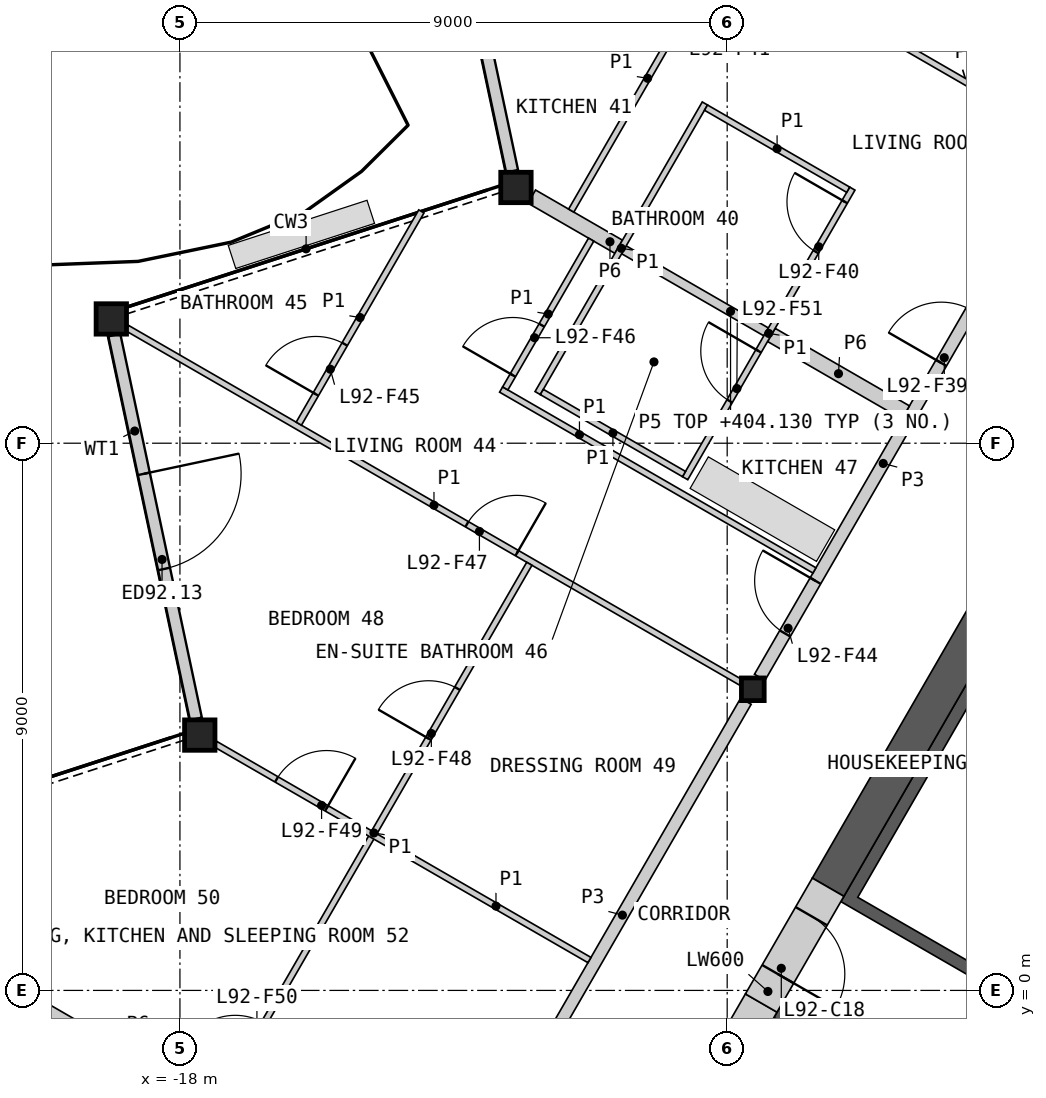
"""IFC4 building model, lengths in metres.
Left out: names, types, materials, properties, quantities, classifications, styles, units other than length and angle.
Written with IfcOpenShell. Run it as: python <this file> out.ifc"""

import sys

from ifc_helpers import new_model, si_unit, direction, frame, frame_2d, origin, origin_2d, place, context, subcontext, project, spatial, polyline, rectangle, hollow_rectangle, i_section, outline, extrude, element, fill, save


model = new_model("IFC4")
c1 = context("Model", 3, precision=1e-05, world=origin(), true_north=direction((0.0, 1.0)))
c2 = subcontext(c1, "Body", "Model", "MODEL_VIEW")
j1 = project(units=[si_unit("LENGTHUNIT", "METRE"), si_unit("PLANEANGLEUNIT", "RADIAN")], contexts=[c1])
p1 = place(None, origin())
s1 = spatial("IfcSite", under=j1, at=p1, CompositionType="ELEMENT")
p2 = place(p1, origin())
s2 = spatial("IfcBuilding", under=s1, at=p2, CompositionType="ELEMENT")
p3 = place(p2, frame((0.0, 0.0, 401.8)))
s3 = spatial("IfcBuildingStorey", under=s2, at=p3, CompositionType="ELEMENT", Elevation=401.8)
for number, where, z_axis, x_axis in (
    (1, (-12.474, 13.206, 0.0), (0.0, 0.0, 1.0), (1.0, 0.0, 0.0)),
    (2, (-19.129, 11.044, 0.0), (0.0, 0.0, 1.0), (1.0, 0.0, 0.0)),
    (3, (-17.674, 4.199, 0.0), (0.0, 0.0, 1.0), (1.0, 0.0, 0.0)),
):
    element("IfcColumn", number, at=place(p3, frame(where, z_axis=z_axis, x_axis=x_axis)), inside=s3, PredefinedType="COLUMN", context=c2, shape_type="SweptSolid", body=[
        extrude(hollow_rectangle(XDim=0.5, YDim=0.5, WallThickness=0.03, at=origin_2d()), origin(), (0.0, 0.0, 1.0), 3.4),
    ])
p4 = place(p3, frame((-8.578, 4.953, 0.0), z_axis=(0.0, 0.0, 1.0), x_axis=(1.0, 0.0, 0.0)))
e4 = element("IfcColumn", 4, at=p4, inside=s3, PredefinedType="COLUMN", context=c2, shape_type="SweptSolid", body=[
    extrude(i_section(OverallWidth=0.374, OverallDepth=0.372, WebThickness=0.016, FlangeThickness=0.026, at=origin_2d()), origin(), (0.0, 0.0, 1.0), 3.4),
])
p5 = place(p3, frame((-13.879, 19.785, 0.0), z_axis=(0.0, 0.0, 1.0), x_axis=(0.207895859675, -0.978150965613, 0.0)))
e5 = element("IfcWall", 5, at=p5, inside=s3, PredefinedType="SOLIDWALL", context=c2, shape_type="SweptSolid", body=[
    extrude(rectangle(XDim=6.453, YDim=0.2, at=frame_2d((3.227, 0.0))), origin(), (0.0, 0.0, 1.0), 2.634),
])
p6 = place(p5, frame((2.333, 0.0, 0.0)))
e6 = element("IfcOpeningElement", 6, at=p6, cuts=e5, PredefinedType="OPENING", context=c2, shape_type="SweptSolid", body=[
    extrude(rectangle(XDim=1.6, YDim=2.25, at=frame_2d((0.8, 1.125))), frame((0.0, 0.11, 0.0), z_axis=(0.0, -1.0, 0.0), x_axis=(1.0, 0.0, 0.0)), (0.0, 0.0, 1.0), 0.22),
])
p7 = place(p3, frame((-19.079, 10.778, 0.0), z_axis=(0.0, 0.0, 1.0), x_axis=(0.207888166349, -0.978152600718, 0.0)))
e7 = element("IfcWall", 7, at=p7, inside=s3, PredefinedType="SOLIDWALL", context=c2, shape_type="SweptSolid", body=[
    extrude(rectangle(XDim=6.453, YDim=0.2, at=frame_2d((3.227, 0.0))), origin(), (0.0, 0.0, 1.0), 2.634),
])
p8 = place(p7, frame((2.333, 0.0, 0.0)))
e8 = element("IfcOpeningElement", 8, at=p8, cuts=e7, PredefinedType="OPENING", context=c2, shape_type="SweptSolid", body=[
    extrude(rectangle(XDim=1.6, YDim=2.25, at=frame_2d((0.8, 1.125))), frame((0.0, 0.11, 0.0), z_axis=(0.0, -1.0, 0.0), x_axis=(1.0, 0.0, 0.0)), (0.0, 0.0, 1.0), 0.22),
])
p9 = place(p3, origin())
e9 = element("IfcWall", 9, at=p9, inside=s3, PredefinedType="SHEAR", context=c2, shape_type="SweptSolid", body=[
    extrude(outline(polyline([(-6.061, -1.697), (-8.231, -0.444), (-8.131, -0.271), (-5.96, -1.524), (-6.061, -1.697)])), origin(), (0.0, 0.0, 1.0), 3.1),
])
p10 = place(p3, origin())
e10 = element("IfcWall", 10, at=p10, inside=s3, PredefinedType="SHEAR", context=c2, shape_type="SweptSolid", body=[
    extrude(outline(polyline([(-4.96, 0.208), (-7.131, 1.461), (-3.731, 7.35), (-1.561, 6.097), (-1.66, 5.924), (-3.652, 7.074), (-6.852, 1.531), (-4.861, 0.381), (-4.96, 0.208)])), origin(), (0.0, 0.0, 1.0), 3.1),
])
p11 = place(p3, frame((-3.794, 7.84, 0.0), z_axis=(0.0, 0.0, 1.0), x_axis=(-0.499974747889, -0.866039982607, 0.0)))
e11 = element("IfcWall", 11, at=p11, inside=s3, PredefinedType="SHEAR", context=c2, shape_type="SweptSolid", body=[
    extrude(rectangle(XDim=7.092, YDim=0.6, at=frame_2d((3.546, 0.0))), origin(), (0.0, 0.0, 1.0), 3.1),
])
p12 = place(p3, frame((-8.44, -0.208, 0.0), z_axis=(0.0, 0.0, 1.0), x_axis=(-0.499997052475, -0.866027105532, 0.0)))
e12 = element("IfcWall", 12, at=p12, inside=s3, PredefinedType="SHEAR", context=c2, shape_type="SweptSolid", body=[
    extrude(rectangle(XDim=3.001, YDim=0.6, at=frame_2d((1.501, 0.0))), origin(), (0.0, 0.0, 1.0), 3.1),
])
p13 = place(p12, frame((1.4, 0.0, 0.0)))
e13 = element("IfcOpeningElement", 13, at=p13, cuts=e12, PredefinedType="OPENING", context=c2, shape_type="SweptSolid", body=[
    extrude(rectangle(XDim=1.0, YDim=2.1, at=frame_2d((0.5, 1.05))), frame((0.0, 0.31, 0.0), z_axis=(0.0, -1.0, 0.0), x_axis=(1.0, 0.0, 0.0)), (0.0, 0.0, 1.0), 0.62),
])
p14 = place(p3, frame((-7.34, 1.698, 0.0), z_axis=(0.0, 0.0, 1.0), x_axis=(-0.50002983664, -0.866008176907, 0.0)))
e14 = element("IfcWall", 14, at=p14, inside=s3, PredefinedType="SHEAR", context=c2, shape_type="SweptSolid", body=[
    extrude(rectangle(XDim=2.2, YDim=0.6, at=frame_2d((1.1, 0.0))), origin(), (0.0, 0.0, 1.0), 3.1),
])
p15 = place(p14, frame((0.55, 0.0, 0.0)))
e15 = element("IfcOpeningElement", 15, at=p15, cuts=e14, PredefinedType="OPENING", context=c2, shape_type="SweptSolid", body=[
    extrude(rectangle(XDim=1.1, YDim=2.1, at=frame_2d((0.55, 1.05))), frame((0.0, 0.31, 0.0), z_axis=(0.0, -1.0, 0.0), x_axis=(1.0, 0.0, 0.0)), (0.0, 0.0, 1.0), 0.62),
])
p16 = place(p3, frame((-24.069, 1.887, 0.0), z_axis=(0.0, 0.0, 1.0), x_axis=(0.866023404247, -0.500003463284, 0.0)))
e16 = element("IfcWall", 16, at=p16, inside=s3, PredefinedType="PARTITIONING", context=c2, shape_type="SweptSolid", body=[
    extrude(rectangle(XDim=11.782, YDim=0.25, at=frame_2d((5.891, 0.0))), origin(), (0.0, 0.0, 1.0), 2.33),
])
p17 = place(p3, frame((-8.465, 5.15, 0.0), z_axis=(0.0, 0.0, 1.0), x_axis=(0.499992155518, 0.866029932751, 0.0)))
e17 = element("IfcWall", 17, at=p17, inside=s3, PredefinedType="PARTITIONING", context=c2, shape_type="SweptSolid", body=[
    extrude(rectangle(XDim=8.123, YDim=0.2, at=frame_2d((4.062, 0.0))), origin(), (0.0, 0.0, 1.0), 3.1),
])
p18 = place(p17, frame((5.97, 0.0, 0.0)))
e18 = element("IfcOpeningElement", 18, at=p18, cuts=e17, PredefinedType="OPENING", context=c2, shape_type="SweptSolid", body=[
    extrude(rectangle(XDim=1.0, YDim=2.1, at=frame_2d((0.5, 1.05))), frame((0.0, 0.11, 0.0), z_axis=(0.0, -1.0, 0.0), x_axis=(1.0, 0.0, 0.0)), (0.0, 0.0, 1.0), 0.22),
])
p19 = place(p17, frame((0.832, 0.0, 0.0)))
e19 = element("IfcOpeningElement", 19, at=p19, cuts=e17, PredefinedType="OPENING", context=c2, shape_type="SweptSolid", body=[
    extrude(rectangle(XDim=1.0, YDim=2.1, at=frame_2d((0.5, 1.05))), frame((0.0, 0.11, 0.0), z_axis=(0.0, -1.0, 0.0), x_axis=(1.0, 0.0, 0.0)), (0.0, 0.0, 1.0), 0.22),
])
p20 = place(p3, frame((-12.754, -2.279, 0.0), z_axis=(0.0, 0.0, 1.0), x_axis=(0.500001682468, 0.866024432409, 0.0)))
e20 = element("IfcWall", 20, at=p20, inside=s3, PredefinedType="PARTITIONING", context=c2, shape_type="SweptSolid", body=[
    extrude(rectangle(XDim=8.124, YDim=0.2, at=frame_2d((4.062, 0.0))), origin(), (0.0, 0.0, 1.0), 3.1),
])
p21 = place(p3, frame((-8.273, 10.781, 0.0), z_axis=(0.0, 0.0, 1.0), x_axis=(0.866030925526, -0.499990435942, 0.0)))
e21 = element("IfcWall", 21, at=p21, inside=s3, PredefinedType="PARTITIONING", context=c2, shape_type="SweptSolid", body=[
    extrude(rectangle(XDim=2.55, YDim=0.25, at=frame_2d((1.275, 0.0))), origin(), (0.0, 0.0, 1.0), 2.33),
])
p22 = place(p3, frame((-12.214, 13.056, 0.0), z_axis=(0.0, 0.0, 1.0), x_axis=(0.866040211805, -0.499974350878, 0.0)))
e22 = element("IfcWall", 22, at=p22, inside=s3, PredefinedType="PARTITIONING", context=c2, shape_type="SweptSolid", body=[
    extrude(rectangle(XDim=1.65, YDim=0.25, at=frame_2d((0.825, 0.0))), origin(), (0.0, 0.0, 1.0), 2.33),
])
p23 = place(p3, frame((-10.698, 12.181, 0.0), z_axis=(0.0, 0.0, 1.0), x_axis=(0.86599734893, -0.500048589285, 0.0)))
e23 = element("IfcWall", 23, at=p23, inside=s3, PredefinedType="PLUMBINGWALL", context=c2, shape_type="SweptSolid", body=[
    extrude(rectangle(XDim=2.7, YDim=0.15, at=frame_2d((1.35, 0.0))), origin(), (0.0, 0.0, 1.0), 2.33),
])
p24 = place(p3, frame((-13.669, 19.9, 0.0), z_axis=(0.0, 0.0, 1.0), x_axis=(0.866032376801, -0.499987922186, 0.0)))
e24 = element("IfcWall", 24, at=p24, inside=s3, PredefinedType="PARTITIONING", context=c2, shape_type="SweptSolid", body=[
    extrude(rectangle(XDim=11.782, YDim=0.1, at=frame_2d((5.891, 0.0))), origin(), (0.0, 0.0, 1.0), 2.33),
])
p25 = place(p24, frame((3.661, 0.0, 0.0)))
e25 = element("IfcOpeningElement", 25, at=p25, cuts=e24, PredefinedType="OPENING", context=c2, shape_type="SweptSolid", body=[
    extrude(rectangle(XDim=0.95, YDim=2.1, at=frame_2d((0.475, 1.05))), frame((0.0, 0.06, 0.0), z_axis=(0.0, -1.0, 0.0), x_axis=(1.0, 0.0, 0.0)), (0.0, 0.0, 1.0), 0.12),
])
p26 = place(p3, frame((-18.869, 10.894, 0.0), z_axis=(0.0, 0.0, 1.0), x_axis=(0.866023724155, -0.500002909193, 0.0)))
e26 = element("IfcWall", 26, at=p26, inside=s3, PredefinedType="PARTITIONING", context=c2, shape_type="SweptSolid", body=[
    extrude(rectangle(XDim=11.655, YDim=0.1, at=frame_2d((5.827, 0.0))), origin(), (0.0, 0.0, 1.0), 2.33),
])
p27 = place(p26, frame((6.453, 0.0, 0.0)))
e27 = element("IfcOpeningElement", 27, at=p27, cuts=e26, PredefinedType="OPENING", context=c2, shape_type="SweptSolid", body=[
    extrude(rectangle(XDim=0.95, YDim=2.1, at=frame_2d((0.475, 1.05))), frame((0.0, 0.06, 0.0), z_axis=(0.0, -1.0, 0.0), x_axis=(1.0, 0.0, 0.0)), (0.0, 0.0, 1.0), 0.12),
])
p28 = place(p3, frame((-17.366, -1.838, 0.0), z_axis=(0.0, 0.0, 1.0), x_axis=(0.499998717582, 0.866026144187, 0.0)))
e28 = element("IfcWall", 28, at=p28, inside=s3, PredefinedType="PARTITIONING", context=c2, shape_type="SweptSolid", body=[
    extrude(rectangle(XDim=10.225, YDim=0.1, at=frame_2d((5.113, 0.0))), origin(), (0.0, 0.0, 1.0), 2.33),
])
p29 = place(p28, frame((6.907, 0.0, 0.0)))
e29 = element("IfcOpeningElement", 29, at=p29, cuts=e28, PredefinedType="OPENING", context=c2, shape_type="SweptSolid", body=[
    extrude(rectangle(XDim=0.95, YDim=2.1, at=frame_2d((0.475, 1.05))), frame((0.0, 0.06, 0.0), z_axis=(0.0, -1.0, 0.0), x_axis=(1.0, 0.0, 0.0)), (0.0, 0.0, 1.0), 0.12),
])
p30 = place(p28, frame((0.552, 0.0, 0.0)))
e30 = element("IfcOpeningElement", 30, at=p30, cuts=e28, PredefinedType="OPENING", context=c2, shape_type="SweptSolid", body=[
    extrude(rectangle(XDim=0.95, YDim=2.1, at=frame_2d((0.475, 1.05))), frame((0.0, 0.06, 0.0), z_axis=(0.0, -1.0, 0.0), x_axis=(1.0, 0.0, 0.0)), (0.0, 0.0, 1.0), 0.12),
])
p31 = place(p3, frame((-17.414, 4.049, 0.0), z_axis=(0.0, 0.0, 1.0), x_axis=(0.866033839264, -0.499985389037, 0.0)))
e31 = element("IfcWall", 31, at=p31, inside=s3, PredefinedType="PARTITIONING", context=c2, shape_type="SweptSolid", body=[
    extrude(rectangle(XDim=7.1, YDim=0.1, at=frame_2d((3.55, 0.0))), origin(), (0.0, 0.0, 1.0), 2.33),
])
p32 = place(p31, frame((1.158, 0.0, 0.0)))
e32 = element("IfcOpeningElement", 32, at=p32, cuts=e31, PredefinedType="OPENING", context=c2, shape_type="SweptSolid", body=[
    extrude(rectangle(XDim=0.95, YDim=2.1, at=frame_2d((0.475, 1.05))), frame((0.0, 0.06, 0.0), z_axis=(0.0, -1.0, 0.0), x_axis=(1.0, 0.0, 0.0)), (0.0, 0.0, 1.0), 0.12),
])
p33 = place(p3, frame((-12.718, 9.883, 0.0), z_axis=(0.0, 0.0, 1.0), x_axis=(0.866017493347, -0.500013701029, 0.0)))
e33 = element("IfcWall", 33, at=p33, inside=s3, PredefinedType="PARTITIONING", context=c2, shape_type="SweptSolid", body=[
    extrude(rectangle(XDim=5.95, YDim=0.1, at=frame_2d((2.975, 0.0))), origin(), (0.0, 0.0, 1.0), 2.33),
])
p34 = place(p3, frame((-12.117, 9.824, 0.0), z_axis=(0.0, 0.0, 1.0), x_axis=(0.499996545922, 0.866027397988, 0.0)))
e34 = element("IfcWall", 34, at=p34, inside=s3, PredefinedType="PARTITIONING", context=c2, shape_type="SweptSolid", body=[
    extrude(rectangle(XDim=5.5, YDim=0.1, at=frame_2d((2.75, 0.0))), origin(), (0.0, 0.0, 1.0), 2.33),
])
p35 = place(p3, frame((-9.692, 8.425, 0.0), z_axis=(0.0, 0.0, 1.0), x_axis=(0.499996545922, 0.866027397988, 0.0)))
e35 = element("IfcWall", 35, at=p35, inside=s3, PredefinedType="PARTITIONING", context=c2, shape_type="SweptSolid", body=[
    extrude(rectangle(XDim=5.5, YDim=0.1, at=frame_2d((2.75, 0.0))), origin(), (0.0, 0.0, 1.0), 2.33),
])
p36 = place(p35, frame((4.3, 0.0, 0.0)))
e36 = element("IfcOpeningElement", 36, at=p36, cuts=e35, PredefinedType="OPENING", context=c2, shape_type="SweptSolid", body=[
    extrude(rectangle(XDim=0.95, YDim=2.1, at=frame_2d((0.475, 1.05))), frame((0.0, 0.06, 0.0), z_axis=(0.0, -1.0, 0.0), x_axis=(1.0, 0.0, 0.0)), (0.0, 0.0, 1.0), 0.12),
])
p37 = place(p35, frame((1.465, 0.0, 0.0)))
e37 = element("IfcOpeningElement", 37, at=p37, cuts=e35, PredefinedType="OPENING", context=c2, shape_type="SweptSolid", body=[
    extrude(rectangle(XDim=0.95, YDim=2.1, at=frame_2d((0.475, 1.05))), frame((0.0, 0.06, 0.0), z_axis=(0.0, -1.0, 0.0), x_axis=(1.0, 0.0, 0.0)), (0.0, 0.0, 1.0), 0.12),
])
p38 = place(p3, frame((-11.565, 12.826, 0.0), z_axis=(0.0, 0.0, 1.0), x_axis=(0.499990214365, 0.86603105345, 0.0)))
e38 = element("IfcWall", 38, at=p38, inside=s3, PredefinedType="PARTITIONING", context=c2, shape_type="SweptSolid", body=[
    extrude(rectangle(XDim=5.025, YDim=0.1, at=frame_2d((2.512, 0.0))), origin(), (0.0, 0.0, 1.0), 2.33),
])
p39 = place(p38, frame((3.11, 0.0, 0.0)))
e39 = element("IfcOpeningElement", 39, at=p39, cuts=e38, PredefinedType="OPENING", context=c2, shape_type="SweptSolid", body=[
    extrude(rectangle(XDim=0.95, YDim=2.1, at=frame_2d((0.475, 1.05))), frame((0.0, 0.06, 0.0), z_axis=(0.0, -1.0, 0.0), x_axis=(1.0, 0.0, 0.0)), (0.0, 0.0, 1.0), 0.12),
])
p40 = place(p3, frame((-16.045, 9.321, 0.0), z_axis=(0.0, 0.0, 1.0), x_axis=(0.500014251897, 0.866017175291, 0.0)))
e40 = element("IfcWall", 40, at=p40, inside=s3, PredefinedType="PARTITIONING", context=c2, shape_type="SweptSolid", body=[
    extrude(rectangle(XDim=4.032, YDim=0.1, at=frame_2d((2.016, 0.0))), origin(), (0.0, 0.0, 1.0), 2.33),
])
p41 = place(p40, frame((0.56, 0.0, 0.0)))
e41 = element("IfcOpeningElement", 41, at=p41, cuts=e40, PredefinedType="OPENING", context=c2, shape_type="SweptSolid", body=[
    extrude(rectangle(XDim=0.95, YDim=2.1, at=frame_2d((0.475, 1.05))), frame((0.0, 0.06, 0.0), z_axis=(0.0, -1.0, 0.0), x_axis=(1.0, 0.0, 0.0)), (0.0, 0.0, 1.0), 0.12),
])
p42 = place(p3, frame((-12.65, 9.901, 0.0), z_axis=(0.0, 0.0, 1.0), x_axis=(0.500024172624, 0.866011447264, 0.0)))
e42 = element("IfcWall", 42, at=p42, inside=s3, PredefinedType="PARTITIONING", context=c2, shape_type="SweptSolid", body=[
    extrude(rectangle(XDim=2.825, YDim=0.1, at=frame_2d((1.413, 0.0))), origin(), (0.0, 0.0, 1.0), 2.33),
])
p43 = place(p42, frame((0.25, 0.0, 0.0)))
e43 = element("IfcOpeningElement", 43, at=p43, cuts=e42, PredefinedType="OPENING", context=c2, shape_type="SweptSolid", body=[
    extrude(rectangle(XDim=0.95, YDim=2.1, at=frame_2d((0.475, 1.05))), frame((0.0, 0.06, 0.0), z_axis=(0.0, -1.0, 0.0), x_axis=(1.0, 0.0, 0.0)), (0.0, 0.0, 1.0), 0.12),
])
for number, where, z_axis, x_axis in (
    (44, (-9.348, 14.519, 0.0), (0.0, 0.0, 1.0), (0.866, -0.5, 0.0)),
    (45, (-12.048, 9.843, 0.0), (0.0, 0.0, 1.0), (0.866, -0.5, 0.0)),
):
    element("IfcWall", number, at=place(p3, frame(where, z_axis=z_axis, x_axis=x_axis)), inside=s3, PredefinedType="PARTITIONING", context=c2, shape_type="SweptSolid", body=[
        extrude(rectangle(XDim=2.7, YDim=0.1, at=frame_2d((1.35, 0.0))), origin(), (0.0, 0.0, 1.0), 2.33),
    ])
p44 = place(p8, origin())
e46 = element("IfcDoor", 46, at=p44, inside=s3, OperationType="DOUBLE_DOOR_SINGLE_SWING", PredefinedType="DOOR", context=c2, shape_type="SweptSolid", body=[
    extrude(rectangle(XDim=1.6, YDim=2.25, at=frame_2d((0.8, 1.125))), frame((0.0, 0.025, 0.0), z_axis=(0.0, -1.0, 0.0), x_axis=(1.0, 0.0, 0.0)), (0.0, 0.0, 1.0), 0.05),
])
fill(e8, e46)
p45 = place(p15, origin())
e47 = element("IfcDoor", 47, at=p45, inside=s3, OperationType="SINGLE_SWING_RIGHT", PredefinedType="DOOR", context=c2, shape_type="SweptSolid", body=[
    extrude(rectangle(XDim=1.1, YDim=2.1, at=frame_2d((0.55, 1.05))), frame((0.0, 0.055, 0.0), z_axis=(0.0, -1.0, 0.0), x_axis=(1.0, 0.0, 0.0)), (0.0, 0.0, 1.0), 0.05),
])
fill(e15, e47)
p46 = place(p18, origin())
e48 = element("IfcDoor", 48, at=p46, inside=s3, OperationType="SINGLE_SWING_LEFT", PredefinedType="DOOR", context=c2, shape_type="SweptSolid", body=[
    extrude(rectangle(XDim=1.0, YDim=2.1, at=frame_2d((0.5, 1.05))), frame((0.0, 0.025, 0.0), z_axis=(0.0, -1.0, 0.0), x_axis=(1.0, 0.0, 0.0)), (0.0, 0.0, 1.0), 0.05),
])
fill(e18, e48)
p47 = place(p36, origin())
e49 = element("IfcDoor", 49, at=p47, inside=s3, OperationType="SINGLE_SWING_RIGHT", PredefinedType="DOOR", context=c2, shape_type="SweptSolid", body=[
    extrude(rectangle(XDim=0.95, YDim=2.1, at=frame_2d((0.475, 1.05))), frame((0.0, 0.025, 0.0), z_axis=(0.0, -1.0, 0.0), x_axis=(1.0, 0.0, 0.0)), (0.0, 0.0, 1.0), 0.05),
])
fill(e36, e49)
p48 = place(p19, origin())
e50 = element("IfcDoor", 50, at=p48, inside=s3, OperationType="SINGLE_SWING_RIGHT", PredefinedType="DOOR", context=c2, shape_type="SweptSolid", body=[
    extrude(rectangle(XDim=1.0, YDim=2.1, at=frame_2d((0.5, 1.05))), frame((0.0, 0.025, 0.0), z_axis=(0.0, -1.0, 0.0), x_axis=(1.0, 0.0, 0.0)), (0.0, 0.0, 1.0), 0.05),
])
fill(e19, e50)
p49 = place(p41, origin())
e51 = element("IfcDoor", 51, at=p49, inside=s3, OperationType="SINGLE_SWING_LEFT", PredefinedType="DOOR", context=c2, shape_type="SweptSolid", body=[
    extrude(rectangle(XDim=0.95, YDim=2.1, at=frame_2d((0.475, 1.05))), frame((0.0, 0.025, 0.0), z_axis=(0.0, -1.0, 0.0), x_axis=(1.0, 0.0, 0.0)), (0.0, 0.0, 1.0), 0.05),
])
fill(e41, e51)
p50 = place(p43, origin())
e52 = element("IfcDoor", 52, at=p50, inside=s3, OperationType="SINGLE_SWING_LEFT", PredefinedType="DOOR", context=c2, shape_type="SweptSolid", body=[
    extrude(rectangle(XDim=0.95, YDim=2.1, at=frame_2d((0.475, 1.05))), frame((0.0, 0.025, 0.0), z_axis=(0.0, -1.0, 0.0), x_axis=(1.0, 0.0, 0.0)), (0.0, 0.0, 1.0), 0.05),
])
fill(e43, e52)
p51 = place(p27, origin())
e53 = element("IfcDoor", 53, at=p51, inside=s3, OperationType="SINGLE_SWING_RIGHT", PredefinedType="DOOR", context=c2, shape_type="SweptSolid", body=[
    extrude(rectangle(XDim=0.95, YDim=2.1, at=frame_2d((0.475, 1.05))), frame((0.0, 0.025, 0.0), z_axis=(0.0, -1.0, 0.0), x_axis=(1.0, 0.0, 0.0)), (0.0, 0.0, 1.0), 0.05),
])
fill(e27, e53)
p52 = place(p29, origin())
e54 = element("IfcDoor", 54, at=p52, inside=s3, OperationType="SINGLE_SWING_LEFT", PredefinedType="DOOR", context=c2, shape_type="SweptSolid", body=[
    extrude(rectangle(XDim=0.95, YDim=2.1, at=frame_2d((0.475, 1.05))), frame((0.0, 0.025, 0.0), z_axis=(0.0, -1.0, 0.0), x_axis=(1.0, 0.0, 0.0)), (0.0, 0.0, 1.0), 0.05),
])
fill(e29, e54)
p53 = place(p32, origin())
e55 = element("IfcDoor", 55, at=p53, inside=s3, OperationType="SINGLE_SWING_RIGHT", PredefinedType="DOOR", context=c2, shape_type="SweptSolid", body=[
    extrude(rectangle(XDim=0.95, YDim=2.1, at=frame_2d((0.475, 1.05))), frame((0.0, 0.025, 0.0), z_axis=(0.0, -1.0, 0.0), x_axis=(1.0, 0.0, 0.0)), (0.0, 0.0, 1.0), 0.05),
])
fill(e32, e55)
p54 = place(p37, origin())
e56 = element("IfcDoor", 56, at=p54, inside=s3, OperationType="SINGLE_SWING_RIGHT", PredefinedType="DOOR", context=c2, shape_type="SweptSolid", body=[
    extrude(rectangle(XDim=0.95, YDim=2.1, at=frame_2d((0.475, 1.05))), frame((0.0, 0.025, 0.0), z_axis=(0.0, -1.0, 0.0), x_axis=(1.0, 0.0, 0.0)), (0.0, 0.0, 1.0), 0.05),
])
fill(e37, e56)
save(model, sys.argv[1])
